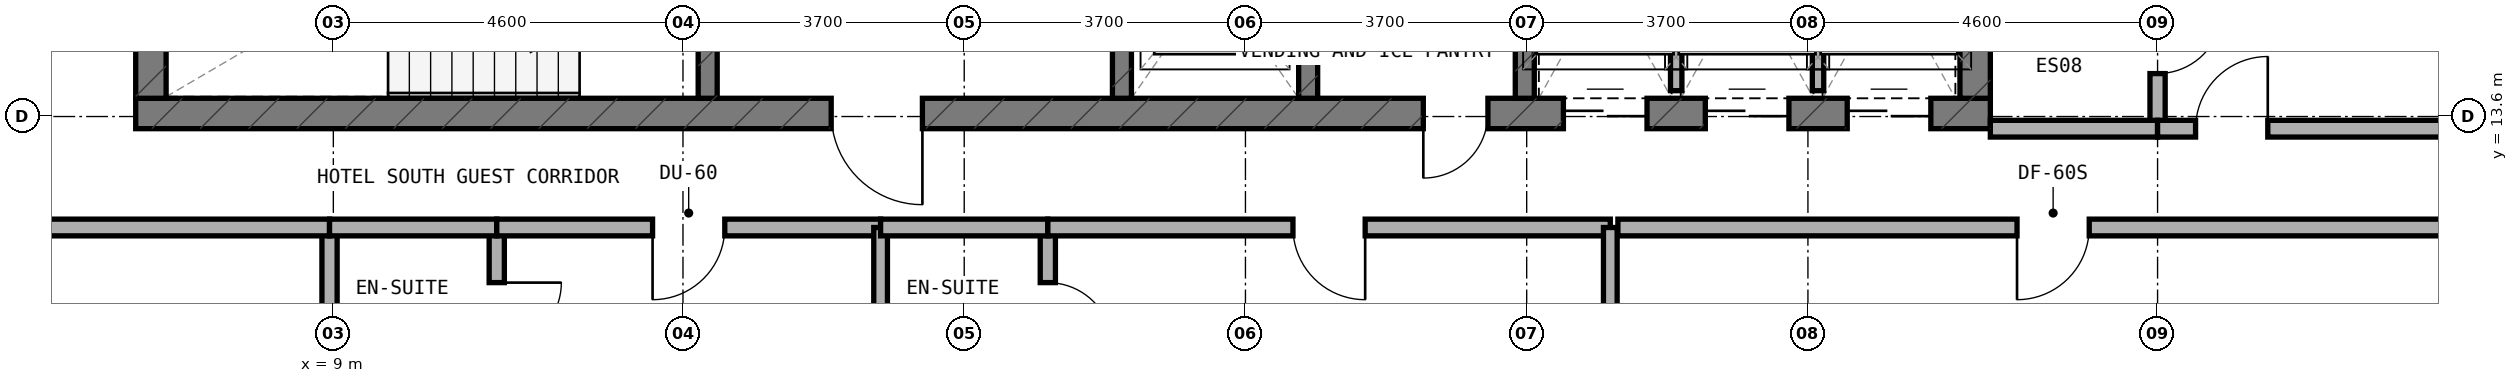
"""IFC4 building model, lengths in metres.
Left out: names, types, materials, properties, quantities, classifications, styles, units other than length and angle.
Written with IfcOpenShell. Run it as: python <this file> out.ifc"""

import sys

from ifc_helpers import new_model, si_unit, direction, frame, frame_2d, origin, place, context, subcontext, project, spatial, rectangle, extrude, element, fill, save


model = new_model("IFC4")
c1 = context("Model", 3, precision=1e-05, world=origin(), true_north=direction((0.0, 1.0)))
c2 = subcontext(c1, "Body", "Model", "MODEL_VIEW")
j1 = project(units=[si_unit("LENGTHUNIT", "METRE"), si_unit("PLANEANGLEUNIT", "RADIAN")], contexts=[c1])
p1 = place(None, origin())
s1 = spatial("IfcSite", under=j1, at=p1, CompositionType="ELEMENT")
p2 = place(p1, origin())
s2 = spatial("IfcBuilding", under=s1, at=p2, CompositionType="ELEMENT")
p3 = place(p2, frame((0.0, 0.0, 254.0)))
s3 = spatial("IfcBuildingStorey", under=s2, at=p3, CompositionType="ELEMENT", Elevation=254.0)
p4 = place(p3, frame((6.4, 13.64, 0.0), z_axis=(0.0, 0.0, 1.0), x_axis=(1.0, 0.0, 0.0)))
e1 = element("IfcWall", 1, at=p4, inside=s3, PredefinedType="SHEAR", context=c2, shape_type="SweptSolid", body=[
    extrude(rectangle(XDim=24.4, YDim=0.4, at=frame_2d((12.2, 0.0))), origin(), (0.0, 0.0, 1.0), 3.6),
])
p5 = place(p4, frame((9.15, 0.0, 0.0)))
e2 = element("IfcOpeningElement", 2, at=p5, cuts=e1, PredefinedType="OPENING", context=c2, shape_type="SweptSolid", body=[
    extrude(rectangle(XDim=1.2, YDim=2.15, at=frame_2d((0.6, 1.075))), frame((0.0, 0.21, 0.0), z_axis=(0.0, -1.0, 0.0), x_axis=(1.0, 0.0, 0.0)), (0.0, 0.0, 1.0), 0.42),
])
p6 = place(p4, frame((16.94, 0.0, 0.0)))
e3 = element("IfcOpeningElement", 3, at=p6, cuts=e1, PredefinedType="OPENING", context=c2, shape_type="SweptSolid", body=[
    extrude(rectangle(XDim=0.85, YDim=2.1, at=frame_2d((0.425, 1.05))), frame((0.0, 0.21, 0.0), z_axis=(0.0, -1.0, 0.0), x_axis=(1.0, 0.0, 0.0)), (0.0, 0.0, 1.0), 0.42),
])
p7 = place(p4, frame((18.783, 0.0, 0.0)))
e4 = element("IfcOpeningElement", 4, at=p7, cuts=e1, PredefinedType="OPENING", context=c2, shape_type="SweptSolid", body=[
    extrude(rectangle(XDim=1.1, YDim=2.15, at=frame_2d((0.55, 1.075))), frame((0.0, 0.21, 0.0), z_axis=(0.0, -1.0, 0.0), x_axis=(1.0, 0.0, 0.0)), (0.0, 0.0, 1.0), 0.42),
])
p8 = place(p4, frame((20.65, 0.0, 0.0)))
e5 = element("IfcOpeningElement", 5, at=p8, cuts=e1, PredefinedType="OPENING", context=c2, shape_type="SweptSolid", body=[
    extrude(rectangle(XDim=1.1, YDim=2.15, at=frame_2d((0.55, 1.075))), frame((0.0, 0.21, 0.0), z_axis=(0.0, -1.0, 0.0), x_axis=(1.0, 0.0, 0.0)), (0.0, 0.0, 1.0), 0.42),
])
p9 = place(p4, frame((22.517, 0.0, 0.0)))
e6 = element("IfcOpeningElement", 6, at=p9, cuts=e1, PredefinedType="OPENING", context=c2, shape_type="SweptSolid", body=[
    extrude(rectangle(XDim=1.1, YDim=2.15, at=frame_2d((0.55, 1.075))), frame((0.0, 0.21, 0.0), z_axis=(0.0, -1.0, 0.0), x_axis=(1.0, 0.0, 0.0)), (0.0, 0.0, 1.0), 0.42),
])
for number, where, z_axis, x_axis in (
    (7, (6.6, 13.84, 0.0), (0.0, 0.0, 1.0), (0.0, 1.0, 0.0)),
    (8, (30.6, 13.84, 0.0), (0.0, 0.0, 1.0), (0.0, 1.0, 0.0)),
):
    element("IfcWall", number, at=place(p3, frame(where, z_axis=z_axis, x_axis=x_axis)), inside=s3, PredefinedType="SHEAR", context=c2, shape_type="SweptSolid", body=[
        extrude(rectangle(XDim=3.16, YDim=0.4, at=frame_2d((1.58, 0.0))), origin(), (0.0, 0.0, 1.0), 3.6),
    ])
p10 = place(p3, frame((13.925, 13.84, 0.0), z_axis=(0.0, 0.0, 1.0), x_axis=(0.0, 1.0, 0.0)))
e9 = element("IfcWall", 9, at=p10, inside=s3, PredefinedType="STANDARD", context=c2, shape_type="SweptSolid", body=[
    extrude(rectangle(XDim=3.16, YDim=0.25, at=frame_2d((1.58, 0.0))), origin(), (0.0, 0.0, 1.0), 3.32),
])
p11 = place(p10, frame((0.98, 0.0, 0.0)))
e10 = element("IfcOpeningElement", 10, at=p11, cuts=e9, PredefinedType="OPENING", context=c2, shape_type="SweptSolid", body=[
    extrude(rectangle(XDim=1.1, YDim=2.15, at=frame_2d((0.55, 1.075))), frame((0.0, 0.135, 0.0), z_axis=(0.0, -1.0, 0.0), x_axis=(1.0, 0.0, 0.0)), (0.0, 0.0, 1.0), 0.27),
])
p12 = place(p3, frame((19.375, 13.84, 0.0), z_axis=(0.0, 0.0, 1.0), x_axis=(0.0, 1.0, 0.0)))
e11 = element("IfcWall", 11, at=p12, inside=s3, PredefinedType="STANDARD", context=c2, shape_type="SweptSolid", body=[
    extrude(rectangle(XDim=3.16, YDim=0.25, at=frame_2d((1.58, 0.0))), origin(), (0.0, 0.0, 1.0), 3.32),
])
p13 = place(p12, frame((0.98, 0.0, 0.0)))
e12 = element("IfcOpeningElement", 12, at=p13, cuts=e11, PredefinedType="OPENING", context=c2, shape_type="SweptSolid", body=[
    extrude(rectangle(XDim=1.1, YDim=2.15, at=frame_2d((0.55, 1.075))), frame((0.0, 0.135, 0.0), z_axis=(0.0, -1.0, 0.0), x_axis=(1.0, 0.0, 0.0)), (0.0, 0.0, 1.0), 0.27),
])
for number, where, z_axis, x_axis in (
    (13, (21.825, 13.84, 0.0), (0.0, 0.0, 1.0), (0.0, 1.0, 0.0)),
    (14, (24.675, 13.84, 0.0), (0.0, 0.0, 1.0), (0.0, 1.0, 0.0)),
):
    element("IfcWall", number, at=place(p3, frame(where, z_axis=z_axis, x_axis=x_axis)), inside=s3, PredefinedType="STANDARD", context=c2, shape_type="SweptSolid", body=[
        extrude(rectangle(XDim=3.16, YDim=0.25, at=frame_2d((1.58, 0.0))), origin(), (0.0, 0.0, 1.0), 3.32),
    ])
p14 = place(p3, frame((26.667, 13.94, 0.0), z_axis=(0.0, 0.0, 1.0), x_axis=(0.0, 1.0, 0.0)))
e15 = element("IfcWall", 15, at=p14, inside=s3, PredefinedType="PARTITIONING", context=c2, shape_type="SweptSolid", body=[
    extrude(rectangle(XDim=2.96, YDim=0.15, at=frame_2d((1.48, 0.0))), origin(), (0.0, 0.0, 1.0), 3.32),
])
p15 = place(p3, frame((28.533, 13.94, 0.0), z_axis=(0.0, 0.0, 1.0), x_axis=(0.0, 1.0, 0.0)))
e16 = element("IfcWall", 16, at=p15, inside=s3, PredefinedType="PARTITIONING", context=c2, shape_type="SweptSolid", body=[
    extrude(rectangle(XDim=2.96, YDim=0.15, at=frame_2d((1.48, 0.0))), origin(), (0.0, 0.0, 1.0), 2.745),
])
p16 = place(p3, frame((11.15, 9.94, 0.0), z_axis=(0.0, 0.0, 1.0), x_axis=(0.0, 1.0, 0.0)))
e17 = element("IfcWall", 17, at=p16, inside=s3, PredefinedType="PLUMBINGWALL", context=c2, shape_type="SweptSolid", body=[
    extrude(rectangle(XDim=2.1, YDim=0.2, at=frame_2d((1.05, 0.0))), origin(), (0.0, 0.0, 1.0), 2.845),
])
p17 = place(p16, frame((0.625, 0.0, 0.0)))
e18 = element("IfcOpeningElement", 18, at=p17, cuts=e17, PredefinedType="OPENING", context=c2, shape_type="SweptSolid", body=[
    extrude(rectangle(XDim=0.85, YDim=2.1, at=frame_2d((0.425, 1.05))), frame((0.0, 0.11, 0.0), z_axis=(0.0, -1.0, 0.0), x_axis=(1.0, 0.0, 0.0)), (0.0, 0.0, 1.0), 0.22),
])
p18 = place(p3, frame((8.95, 9.94, 0.0), z_axis=(0.0, 0.0, 1.0), x_axis=(0.0, 1.0, 0.0)))
e19 = element("IfcWall", 19, at=p18, inside=s3, PredefinedType="PLUMBINGWALL", context=c2, shape_type="SweptSolid", body=[
    extrude(rectangle(XDim=2.1, YDim=0.2, at=frame_2d((1.05, 0.0))), origin(), (0.0, 0.0, 1.0), 2.845),
])
p19 = place(p3, frame((3.36, 12.14, 0.0), z_axis=(0.0, 0.0, 1.0), x_axis=(1.0, 0.0, 0.0)))
e20 = element("IfcWall", 20, at=p19, inside=s3, PredefinedType="SOLIDWALL", context=c2, shape_type="SweptSolid", body=[
    extrude(rectangle(XDim=5.59, YDim=0.22, at=frame_2d((2.795, 0.0))), origin(), (0.0, 0.0, 1.0), 2.745),
])
p20 = place(p3, frame((8.95, 12.14, 0.0), z_axis=(0.0, 0.0, 1.0), x_axis=(1.0, 0.0, 0.0)))
e21 = element("IfcWall", 21, at=p20, inside=s3, PredefinedType="SOLIDWALL", context=c2, shape_type="SweptSolid", body=[
    extrude(rectangle(XDim=2.2, YDim=0.22, at=frame_2d((1.1, 0.0))), origin(), (0.0, 0.0, 1.0), 3.32),
])
p21 = place(p3, frame((11.15, 12.14, 0.0), z_axis=(0.0, 0.0, 1.0), x_axis=(1.0, 0.0, 0.0)))
e22 = element("IfcWall", 22, at=p21, inside=s3, PredefinedType="SOLIDWALL", context=c2, shape_type="SweptSolid", body=[
    extrude(rectangle(XDim=5.05, YDim=0.22, at=frame_2d((2.525, 0.0))), origin(), (0.0, 0.0, 1.0), 2.745),
])
p22 = place(p21, frame((2.05, 0.0, 0.0)))
e23 = element("IfcOpeningElement", 23, at=p22, cuts=e22, PredefinedType="OPENING", context=c2, shape_type="SweptSolid", body=[
    extrude(rectangle(XDim=0.95, YDim=2.1, at=frame_2d((0.475, 1.05))), frame((0.0, 0.12, 0.0), z_axis=(0.0, -1.0, 0.0), x_axis=(1.0, 0.0, 0.0)), (0.0, 0.0, 1.0), 0.24),
])
p23 = place(p3, frame((16.2, 6.86, 0.0), z_axis=(0.0, 0.0, 1.0), x_axis=(0.0, 1.0, 0.0)))
e24 = element("IfcWall", 24, at=p23, inside=s3, PredefinedType="SOLIDWALL", context=c2, shape_type="SweptSolid", body=[
    extrude(rectangle(XDim=5.28, YDim=0.18, at=frame_2d((2.64, 0.0))), origin(), (0.0, 0.0, 1.0), 2.745),
])
p24 = place(p3, frame((18.4, 9.94, 0.0), z_axis=(0.0, 0.0, 1.0), x_axis=(0.0, 1.0, 0.0)))
e25 = element("IfcWall", 25, at=p24, inside=s3, PredefinedType="PLUMBINGWALL", context=c2, shape_type="SweptSolid", body=[
    extrude(rectangle(XDim=2.1, YDim=0.2, at=frame_2d((1.05, 0.0))), origin(), (0.0, 0.0, 1.0), 2.845),
])
p25 = place(p24, frame((0.625, 0.0, 0.0)))
e26 = element("IfcOpeningElement", 26, at=p25, cuts=e25, PredefinedType="OPENING", context=c2, shape_type="SweptSolid", body=[
    extrude(rectangle(XDim=0.85, YDim=2.1, at=frame_2d((0.425, 1.05))), frame((0.0, 0.11, 0.0), z_axis=(0.0, -1.0, 0.0), x_axis=(1.0, 0.0, 0.0)), (0.0, 0.0, 1.0), 0.22),
])
p26 = place(p3, frame((16.2, 12.14, 0.0), z_axis=(0.0, 0.0, 1.0), x_axis=(1.0, 0.0, 0.0)))
e27 = element("IfcWall", 27, at=p26, inside=s3, PredefinedType="SOLIDWALL", context=c2, shape_type="SweptSolid", body=[
    extrude(rectangle(XDim=2.2, YDim=0.22, at=frame_2d((1.1, 0.0))), origin(), (0.0, 0.0, 1.0), 2.745),
])
p27 = place(p3, frame((18.4, 12.14, 0.0), z_axis=(0.0, 0.0, 1.0), x_axis=(1.0, 0.0, 0.0)))
e28 = element("IfcWall", 28, at=p27, inside=s3, PredefinedType="SOLIDWALL", context=c2, shape_type="SweptSolid", body=[
    extrude(rectangle(XDim=7.4, YDim=0.22, at=frame_2d((3.7, 0.0))), origin(), (0.0, 0.0, 1.0), 2.745),
])
p28 = place(p27, frame((3.225, 0.0, 0.0)))
e29 = element("IfcOpeningElement", 29, at=p28, cuts=e28, PredefinedType="OPENING", context=c2, shape_type="SweptSolid", body=[
    extrude(rectangle(XDim=0.95, YDim=2.1, at=frame_2d((0.475, 1.05))), frame((0.0, 0.12, 0.0), z_axis=(0.0, -1.0, 0.0), x_axis=(1.0, 0.0, 0.0)), (0.0, 0.0, 1.0), 0.24),
])
p29 = place(p3, frame((25.8, 6.86, 0.0), z_axis=(0.0, 0.0, 1.0), x_axis=(0.0, 1.0, 0.0)))
e30 = element("IfcWall", 30, at=p29, inside=s3, PredefinedType="SOLIDWALL", context=c2, shape_type="SweptSolid", body=[
    extrude(rectangle(XDim=5.28, YDim=0.18, at=frame_2d((2.64, 0.0))), origin(), (0.0, 0.0, 1.0), 2.745),
])
p30 = place(p3, frame((25.9, 12.14, 0.0), z_axis=(0.0, 0.0, 1.0), x_axis=(1.0, 0.0, 0.0)))
e31 = element("IfcWall", 31, at=p30, inside=s3, PredefinedType="SOLIDWALL", context=c2, shape_type="SweptSolid", body=[
    extrude(rectangle(XDim=12.64, YDim=0.22, at=frame_2d((6.32, 0.0))), origin(), (0.0, 0.0, 1.0), 2.745),
])
p31 = place(p30, frame((5.251, 0.0, 0.0)))
e32 = element("IfcOpeningElement", 32, at=p31, cuts=e31, PredefinedType="OPENING", context=c2, shape_type="SweptSolid", body=[
    extrude(rectangle(XDim=0.95, YDim=2.1, at=frame_2d((0.475, 1.05))), frame((0.0, 0.12, 0.0), z_axis=(0.0, -1.0, 0.0), x_axis=(1.0, 0.0, 0.0)), (0.0, 0.0, 1.0), 0.24),
])
p32 = place(p3, frame((33.0, 13.54, 0.0), z_axis=(0.0, 0.0, 1.0), x_axis=(0.0, 1.0, 0.0)))
e33 = element("IfcWall", 33, at=p32, inside=s3, PredefinedType="PLUMBINGWALL", context=c2, shape_type="SweptSolid", body=[
    extrude(rectangle(XDim=2.1, YDim=0.2, at=frame_2d((1.05, 0.0))), origin(), (0.0, 0.0, 1.0), 3.32),
])
p33 = place(p32, frame((0.625, 0.0, 0.0)))
e34 = element("IfcOpeningElement", 34, at=p33, cuts=e33, PredefinedType="OPENING", context=c2, shape_type="SweptSolid", body=[
    extrude(rectangle(XDim=0.85, YDim=2.1, at=frame_2d((0.425, 1.05))), frame((0.0, 0.11, 0.0), z_axis=(0.0, -1.0, 0.0), x_axis=(1.0, 0.0, 0.0)), (0.0, 0.0, 1.0), 0.22),
])
p34 = place(p3, frame((30.8, 13.44, 0.0), z_axis=(0.0, 0.0, 1.0), x_axis=(1.0, 0.0, 0.0)))
e35 = element("IfcWall", 35, at=p34, inside=s3, PredefinedType="SOLIDWALL", context=c2, shape_type="SweptSolid", body=[
    extrude(rectangle(XDim=2.2, YDim=0.22, at=frame_2d((1.1, 0.0))), origin(), (0.0, 0.0, 1.0), 3.32),
])
p35 = place(p3, frame((33.0, 13.44, 0.0), z_axis=(0.0, 0.0, 1.0), x_axis=(1.0, 0.0, 0.0)))
e36 = element("IfcWall", 36, at=p35, inside=s3, PredefinedType="SOLIDWALL", context=c2, shape_type="SweptSolid", body=[
    extrude(rectangle(XDim=5.8, YDim=0.22, at=frame_2d((2.9, 0.0))), origin(), (0.0, 0.0, 1.0), 2.745),
])
p36 = place(p35, frame((0.5, 0.0, 0.0)))
e37 = element("IfcOpeningElement", 37, at=p36, cuts=e36, PredefinedType="OPENING", context=c2, shape_type="SweptSolid", body=[
    extrude(rectangle(XDim=0.95, YDim=2.1, at=frame_2d((0.475, 1.05))), frame((0.0, 0.12, 0.0), z_axis=(0.0, -1.0, 0.0), x_axis=(1.0, 0.0, 0.0)), (0.0, 0.0, 1.0), 0.24),
])
p37 = place(p5, frame((1.2, 0.0, 0.0), z_axis=(0.0, 0.0, 1.0), x_axis=(-1.0, 0.0, 0.0)))
e38 = element("IfcDoor", 38, at=p37, inside=s3, OperationType="SINGLE_SWING_LEFT", PredefinedType="DOOR", context=c2, shape_type="SweptSolid", body=[
    extrude(rectangle(XDim=1.2, YDim=2.15, at=frame_2d((0.6, 1.075))), frame((0.0, 0.025, 0.0), z_axis=(0.0, -1.0, 0.0), x_axis=(1.0, 0.0, 0.0)), (0.0, 0.0, 1.0), 0.05),
])
fill(e2, e38)
p38 = place(p6, frame((0.85, 0.0, 0.0), z_axis=(0.0, 0.0, 1.0), x_axis=(-1.0, 0.0, 0.0)))
e39 = element("IfcDoor", 39, at=p38, inside=s3, OperationType="SINGLE_SWING_RIGHT", PredefinedType="DOOR", context=c2, shape_type="SweptSolid", body=[
    extrude(rectangle(XDim=0.85, YDim=2.1, at=frame_2d((0.425, 1.05))), frame((0.0, 0.025, 0.0), z_axis=(0.0, -1.0, 0.0), x_axis=(1.0, 0.0, 0.0)), (0.0, 0.0, 1.0), 0.05),
])
fill(e3, e39)
p39 = place(p7, frame((1.1, 0.0, 0.0), z_axis=(0.0, 0.0, 1.0), x_axis=(-1.0, 0.0, 0.0)))
e40 = element("IfcDoor", 40, at=p39, inside=s3, OperationType="DOUBLE_DOOR_SLIDING", PredefinedType="DOOR", context=c2, shape_type="SweptSolid", body=[
    extrude(rectangle(XDim=1.1, YDim=2.15, at=frame_2d((0.55, 1.075))), frame((0.0, 0.025, 0.0), z_axis=(0.0, -1.0, 0.0), x_axis=(1.0, 0.0, 0.0)), (0.0, 0.0, 1.0), 0.05),
])
fill(e4, e40)
p40 = place(p8, frame((1.1, 0.0, 0.0), z_axis=(0.0, 0.0, 1.0), x_axis=(-1.0, 0.0, 0.0)))
e41 = element("IfcDoor", 41, at=p40, inside=s3, OperationType="DOUBLE_DOOR_SLIDING", PredefinedType="DOOR", context=c2, shape_type="SweptSolid", body=[
    extrude(rectangle(XDim=1.1, YDim=2.15, at=frame_2d((0.55, 1.075))), frame((0.0, 0.025, 0.0), z_axis=(0.0, -1.0, 0.0), x_axis=(1.0, 0.0, 0.0)), (0.0, 0.0, 1.0), 0.05),
])
fill(e5, e41)
p41 = place(p9, frame((1.1, 0.0, 0.0), z_axis=(0.0, 0.0, 1.0), x_axis=(-1.0, 0.0, 0.0)))
e42 = element("IfcDoor", 42, at=p41, inside=s3, OperationType="DOUBLE_DOOR_SLIDING", PredefinedType="DOOR", context=c2, shape_type="SweptSolid", body=[
    extrude(rectangle(XDim=1.1, YDim=2.15, at=frame_2d((0.55, 1.075))), frame((0.0, 0.025, 0.0), z_axis=(0.0, -1.0, 0.0), x_axis=(1.0, 0.0, 0.0)), (0.0, 0.0, 1.0), 0.05),
])
fill(e6, e42)
p42 = place(p17, frame((0.85, 0.0, 0.0), z_axis=(0.0, 0.0, 1.0), x_axis=(-1.0, 0.0, 0.0)))
e43 = element("IfcDoor", 43, at=p42, inside=s3, OperationType="SINGLE_SWING_LEFT", PredefinedType="DOOR", context=c2, shape_type="SweptSolid", body=[
    extrude(rectangle(XDim=0.85, YDim=2.1, at=frame_2d((0.425, 1.05))), frame((0.0, 0.025, 0.0), z_axis=(0.0, -1.0, 0.0), x_axis=(1.0, 0.0, 0.0)), (0.0, 0.0, 1.0), 0.05),
])
fill(e18, e43)
p43 = place(p22, frame((0.95, 0.0, 0.0), z_axis=(0.0, 0.0, 1.0), x_axis=(-1.0, 0.0, 0.0)))
e44 = element("IfcDoor", 44, at=p43, inside=s3, OperationType="SINGLE_SWING_RIGHT", PredefinedType="DOOR", context=c2, shape_type="SweptSolid", body=[
    extrude(rectangle(XDim=0.95, YDim=2.1, at=frame_2d((0.475, 1.05))), frame((0.0, 0.025, 0.0), z_axis=(0.0, -1.0, 0.0), x_axis=(1.0, 0.0, 0.0)), (0.0, 0.0, 1.0), 0.05),
])
fill(e23, e44)
p44 = place(p25, frame((0.85, 0.0, 0.0), z_axis=(0.0, 0.0, 1.0), x_axis=(-1.0, 0.0, 0.0)))
e45 = element("IfcDoor", 45, at=p44, inside=s3, OperationType="SINGLE_SWING_RIGHT", PredefinedType="DOOR", context=c2, shape_type="SweptSolid", body=[
    extrude(rectangle(XDim=0.85, YDim=2.1, at=frame_2d((0.425, 1.05))), frame((0.0, 0.025, 0.0), z_axis=(0.0, -1.0, 0.0), x_axis=(1.0, 0.0, 0.0)), (0.0, 0.0, 1.0), 0.05),
])
fill(e26, e45)
p45 = place(p28, frame((0.95, 0.0, 0.0), z_axis=(0.0, 0.0, 1.0), x_axis=(-1.0, 0.0, 0.0)))
e46 = element("IfcDoor", 46, at=p45, inside=s3, OperationType="SINGLE_SWING_LEFT", PredefinedType="DOOR", context=c2, shape_type="SweptSolid", body=[
    extrude(rectangle(XDim=0.95, YDim=2.1, at=frame_2d((0.475, 1.05))), frame((0.0, 0.025, 0.0), z_axis=(0.0, -1.0, 0.0), x_axis=(1.0, 0.0, 0.0)), (0.0, 0.0, 1.0), 0.05),
])
fill(e29, e46)
p46 = place(p31, frame((0.95, 0.0, 0.0), z_axis=(0.0, 0.0, 1.0), x_axis=(-1.0, 0.0, 0.0)))
e47 = element("IfcDoor", 47, at=p46, inside=s3, OperationType="SINGLE_SWING_RIGHT", PredefinedType="DOOR", context=c2, shape_type="SweptSolid", body=[
    extrude(rectangle(XDim=0.95, YDim=2.1, at=frame_2d((0.475, 1.05))), frame((0.0, 0.025, 0.0), z_axis=(0.0, -1.0, 0.0), x_axis=(1.0, 0.0, 0.0)), (0.0, 0.0, 1.0), 0.05),
])
fill(e32, e47)
p47 = place(p33, frame((0.85, 0.0, 0.0), z_axis=(0.0, 0.0, 1.0), x_axis=(-1.0, 0.0, 0.0)))
e48 = element("IfcDoor", 48, at=p47, inside=s3, OperationType="SINGLE_SWING_LEFT", PredefinedType="DOOR", context=c2, shape_type="SweptSolid", body=[
    extrude(rectangle(XDim=0.85, YDim=2.1, at=frame_2d((0.425, 1.05))), frame((0.0, 0.025, 0.0), z_axis=(0.0, -1.0, 0.0), x_axis=(1.0, 0.0, 0.0)), (0.0, 0.0, 1.0), 0.05),
])
fill(e34, e48)
p48 = place(p36, origin())
e49 = element("IfcDoor", 49, at=p48, inside=s3, OperationType="SINGLE_SWING_RIGHT", PredefinedType="DOOR", context=c2, shape_type="SweptSolid", body=[
    extrude(rectangle(XDim=0.95, YDim=2.1, at=frame_2d((0.475, 1.05))), frame((0.0, 0.025, 0.0), z_axis=(0.0, -1.0, 0.0), x_axis=(1.0, 0.0, 0.0)), (0.0, 0.0, 1.0), 0.05),
])
fill(e37, e49)
save(model, sys.argv[1])
